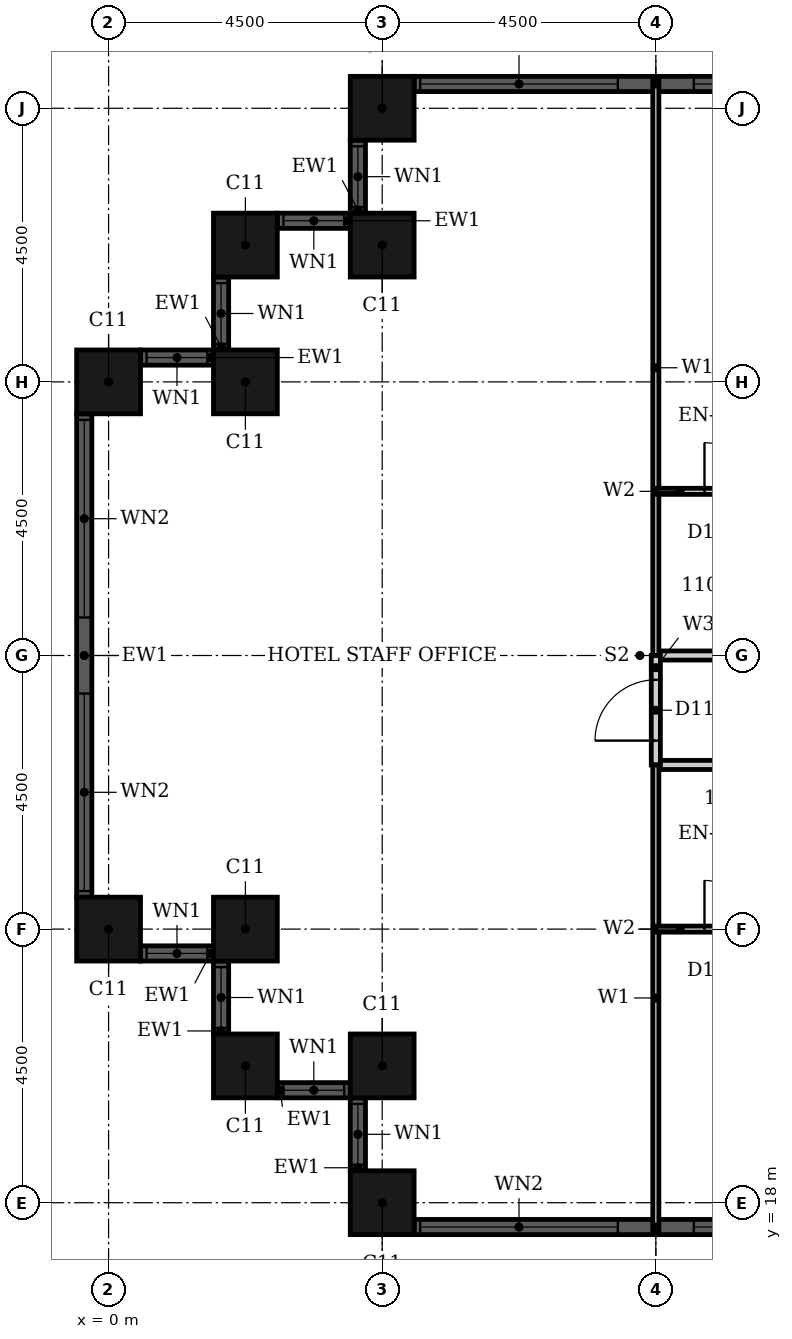
"""IFC4 building model, lengths in metres.
Left out: names, types, materials, properties, quantities, classifications, styles, units other than length and angle.
Written with IfcOpenShell. Run it as: python <this file> out.ifc"""

import sys

from ifc_helpers import new_model, si_unit, direction, frame, frame_2d, origin, origin_2d, place, context, subcontext, project, spatial, rectangle, hollow_rectangle, extrude, element, fill, save


model = new_model("IFC4")
c1 = context("Model", 3, precision=1e-05, world=origin(), true_north=direction((0.0, 1.0)))
c2 = subcontext(c1, "Body", "Model", "MODEL_VIEW")
j1 = project(units=[si_unit("LENGTHUNIT", "METRE"), si_unit("PLANEANGLEUNIT", "RADIAN")], contexts=[c1])
p1 = place(None, origin())
s1 = spatial("IfcSite", under=j1, at=p1, CompositionType="ELEMENT")
p2 = place(p1, origin())
s2 = spatial("IfcBuilding", under=s1, at=p2, CompositionType="ELEMENT")
p3 = place(p2, frame((0.0, 0.0, 52.8)))
s3 = spatial("IfcBuildingStorey", under=s2, at=p3, CompositionType="ELEMENT", Elevation=52.8)
for number, where, z_axis, x_axis in (
    (1, (4.5, 36.0, 0.0), (0.0, 0.0, 1.0), (1.0, 0.0, 0.0)),
    (2, (4.5, 33.75, 0.0), (0.0, 0.0, 1.0), (1.0, 0.0, 0.0)),
    (3, (2.25, 33.75, 0.0), (0.0, 0.0, 1.0), (1.0, 0.0, 0.0)),
    (4, (2.25, 31.5, 0.0), (0.0, 0.0, 1.0), (1.0, 0.0, 0.0)),
    (5, (0.0, 31.5, 0.0), (0.0, 0.0, 1.0), (1.0, 0.0, 0.0)),
    (6, (0.0, 22.5, 0.0), (0.0, 0.0, 1.0), (1.0, 0.0, 0.0)),
    (7, (2.25, 22.5, 0.0), (0.0, 0.0, 1.0), (1.0, 0.0, 0.0)),
    (8, (2.25, 20.25, 0.0), (0.0, 0.0, 1.0), (1.0, 0.0, 0.0)),
    (9, (4.5, 20.25, 0.0), (0.0, 0.0, 1.0), (1.0, 0.0, 0.0)),
    (10, (4.5, 18.0, 0.0), (0.0, 0.0, 1.0), (1.0, 0.0, 0.0)),
):
    element("IfcColumn", number, at=place(p3, frame(where, z_axis=z_axis, x_axis=x_axis)), inside=s3, PredefinedType="COLUMN", context=c2, shape_type="SweptSolid", body=[
        extrude(hollow_rectangle(XDim=1.05, YDim=1.05, WallThickness=0.034, at=origin_2d()), origin(), (0.0, 0.0, 1.0), 3.6),
    ])
p4 = place(p3, frame((12.975, 36.4, 0.0), z_axis=(0.0, 0.0, 1.0), x_axis=(-1.0, 0.0, 0.0)))
e11 = element("IfcWall", 11, at=p4, inside=s3, PredefinedType="SOLIDWALL", context=c2, shape_type="SweptSolid", body=[
    extrude(rectangle(XDim=7.95, YDim=0.25, at=frame_2d((3.975, 0.0))), origin(), (0.0, 0.0, 1.0), 3.6),
])
p5 = place(p4, frame((0.1, 0.0, 0.9)))
e12 = element("IfcOpeningElement", 12, at=p5, cuts=e11, PredefinedType="OPENING", context=c2, shape_type="SweptSolid", body=[
    extrude(rectangle(XDim=3.25, YDim=2.08, at=frame_2d((1.625, 1.04))), frame((0.0, 0.135, 0.0), z_axis=(0.0, -1.0, 0.0), x_axis=(1.0, 0.0, 0.0)), (0.0, 0.0, 1.0), 0.27),
])
p6 = place(p4, frame((4.6, 0.0, 0.9)))
e13 = element("IfcOpeningElement", 13, at=p6, cuts=e11, PredefinedType="OPENING", context=c2, shape_type="SweptSolid", body=[
    extrude(rectangle(XDim=3.25, YDim=2.08, at=frame_2d((1.625, 1.04))), frame((0.0, 0.135, 0.0), z_axis=(0.0, -1.0, 0.0), x_axis=(1.0, 0.0, 0.0)), (0.0, 0.0, 1.0), 0.27),
])
p7 = place(p3, frame((4.1, 35.475, 0.0), z_axis=(0.0, 0.0, 1.0), x_axis=(0.0, -1.0, 0.0)))
e14 = element("IfcWall", 14, at=p7, inside=s3, PredefinedType="SOLIDWALL", context=c2, shape_type="SweptSolid", body=[
    extrude(rectangle(XDim=1.2, YDim=0.25, at=frame_2d((0.6, 0.0))), origin(), (0.0, 0.0, 1.0), 3.6),
])
p8 = place(p7, frame((0.1, 0.0, 0.9)))
e15 = element("IfcOpeningElement", 15, at=p8, cuts=e14, PredefinedType="OPENING", context=c2, shape_type="SweptSolid", body=[
    extrude(rectangle(XDim=1.0, YDim=2.08, at=frame_2d((0.5, 1.04))), frame((0.0, 0.135, 0.0), z_axis=(0.0, -1.0, 0.0), x_axis=(1.0, 0.0, 0.0)), (0.0, 0.0, 1.0), 0.27),
])
p9 = place(p3, frame((3.975, 34.15, 0.0), z_axis=(0.0, 0.0, 1.0), x_axis=(-1.0, 0.0, 0.0)))
e16 = element("IfcWall", 16, at=p9, inside=s3, PredefinedType="SOLIDWALL", context=c2, shape_type="SweptSolid", body=[
    extrude(rectangle(XDim=1.2, YDim=0.25, at=frame_2d((0.6, 0.0))), origin(), (0.0, 0.0, 1.0), 3.6),
])
p10 = place(p9, frame((0.1, 0.0, 0.9)))
e17 = element("IfcOpeningElement", 17, at=p10, cuts=e16, PredefinedType="OPENING", context=c2, shape_type="SweptSolid", body=[
    extrude(rectangle(XDim=1.0, YDim=2.08, at=frame_2d((0.5, 1.04))), frame((0.0, 0.135, 0.0), z_axis=(0.0, -1.0, 0.0), x_axis=(1.0, 0.0, 0.0)), (0.0, 0.0, 1.0), 0.27),
])
p11 = place(p3, frame((1.85, 33.225, 0.0), z_axis=(0.0, 0.0, 1.0), x_axis=(0.0, -1.0, 0.0)))
e18 = element("IfcWall", 18, at=p11, inside=s3, PredefinedType="SOLIDWALL", context=c2, shape_type="SweptSolid", body=[
    extrude(rectangle(XDim=1.2, YDim=0.25, at=frame_2d((0.6, 0.0))), origin(), (0.0, 0.0, 1.0), 3.6),
])
p12 = place(p11, frame((0.1, 0.0, 0.9)))
e19 = element("IfcOpeningElement", 19, at=p12, cuts=e18, PredefinedType="OPENING", context=c2, shape_type="SweptSolid", body=[
    extrude(rectangle(XDim=1.0, YDim=2.08, at=frame_2d((0.5, 1.04))), frame((0.0, 0.135, 0.0), z_axis=(0.0, -1.0, 0.0), x_axis=(1.0, 0.0, 0.0)), (0.0, 0.0, 1.0), 0.27),
])
p13 = place(p3, frame((1.725, 31.9, 0.0), z_axis=(0.0, 0.0, 1.0), x_axis=(-1.0, 0.0, 0.0)))
e20 = element("IfcWall", 20, at=p13, inside=s3, PredefinedType="SOLIDWALL", context=c2, shape_type="SweptSolid", body=[
    extrude(rectangle(XDim=1.2, YDim=0.25, at=frame_2d((0.6, 0.0))), origin(), (0.0, 0.0, 1.0), 3.6),
])
p14 = place(p13, frame((0.1, 0.0, 0.9)))
e21 = element("IfcOpeningElement", 21, at=p14, cuts=e20, PredefinedType="OPENING", context=c2, shape_type="SweptSolid", body=[
    extrude(rectangle(XDim=1.0, YDim=2.08, at=frame_2d((0.5, 1.04))), frame((0.0, 0.135, 0.0), z_axis=(0.0, -1.0, 0.0), x_axis=(1.0, 0.0, 0.0)), (0.0, 0.0, 1.0), 0.27),
])
p15 = place(p3, frame((-0.4, 30.975, 0.0), z_axis=(0.0, 0.0, 1.0), x_axis=(0.0, -1.0, 0.0)))
e22 = element("IfcWall", 22, at=p15, inside=s3, PredefinedType="SOLIDWALL", context=c2, shape_type="SweptSolid", body=[
    extrude(rectangle(XDim=7.95, YDim=0.25, at=frame_2d((3.975, 0.0))), origin(), (0.0, 0.0, 1.0), 3.6),
])
p16 = place(p15, frame((0.1, 0.0, 0.9)))
e23 = element("IfcOpeningElement", 23, at=p16, cuts=e22, PredefinedType="OPENING", context=c2, shape_type="SweptSolid", body=[
    extrude(rectangle(XDim=3.25, YDim=2.08, at=frame_2d((1.625, 1.04))), frame((0.0, 0.135, 0.0), z_axis=(0.0, -1.0, 0.0), x_axis=(1.0, 0.0, 0.0)), (0.0, 0.0, 1.0), 0.27),
])
p17 = place(p15, frame((4.6, 0.0, 0.9)))
e24 = element("IfcOpeningElement", 24, at=p17, cuts=e22, PredefinedType="OPENING", context=c2, shape_type="SweptSolid", body=[
    extrude(rectangle(XDim=3.25, YDim=2.08, at=frame_2d((1.625, 1.04))), frame((0.0, 0.135, 0.0), z_axis=(0.0, -1.0, 0.0), x_axis=(1.0, 0.0, 0.0)), (0.0, 0.0, 1.0), 0.27),
])
p18 = place(p3, frame((0.525, 22.1, 0.0), z_axis=(0.0, 0.0, 1.0), x_axis=(1.0, 0.0, 0.0)))
e25 = element("IfcWall", 25, at=p18, inside=s3, PredefinedType="SOLIDWALL", context=c2, shape_type="SweptSolid", body=[
    extrude(rectangle(XDim=1.2, YDim=0.25, at=frame_2d((0.6, 0.0))), origin(), (0.0, 0.0, 1.0), 3.6),
])
p19 = place(p18, frame((0.1, 0.0, 0.9)))
e26 = element("IfcOpeningElement", 26, at=p19, cuts=e25, PredefinedType="OPENING", context=c2, shape_type="SweptSolid", body=[
    extrude(rectangle(XDim=1.0, YDim=2.08, at=frame_2d((0.5, 1.04))), frame((0.0, 0.135, 0.0), z_axis=(0.0, -1.0, 0.0), x_axis=(1.0, 0.0, 0.0)), (0.0, 0.0, 1.0), 0.27),
])
p20 = place(p3, frame((1.85, 21.975, 0.0), z_axis=(0.0, 0.0, 1.0), x_axis=(0.0, -1.0, 0.0)))
e27 = element("IfcWall", 27, at=p20, inside=s3, PredefinedType="SOLIDWALL", context=c2, shape_type="SweptSolid", body=[
    extrude(rectangle(XDim=1.2, YDim=0.25, at=frame_2d((0.6, 0.0))), origin(), (0.0, 0.0, 1.0), 3.6),
])
p21 = place(p20, frame((0.1, 0.0, 0.9)))
e28 = element("IfcOpeningElement", 28, at=p21, cuts=e27, PredefinedType="OPENING", context=c2, shape_type="SweptSolid", body=[
    extrude(rectangle(XDim=1.0, YDim=2.08, at=frame_2d((0.5, 1.04))), frame((0.0, 0.135, 0.0), z_axis=(0.0, -1.0, 0.0), x_axis=(1.0, 0.0, 0.0)), (0.0, 0.0, 1.0), 0.27),
])
p22 = place(p3, frame((2.775, 19.85, 0.0), z_axis=(0.0, 0.0, 1.0), x_axis=(1.0, 0.0, 0.0)))
e29 = element("IfcWall", 29, at=p22, inside=s3, PredefinedType="SOLIDWALL", context=c2, shape_type="SweptSolid", body=[
    extrude(rectangle(XDim=1.2, YDim=0.25, at=frame_2d((0.6, 0.0))), origin(), (0.0, 0.0, 1.0), 3.6),
])
p23 = place(p22, frame((0.1, 0.0, 0.9)))
e30 = element("IfcOpeningElement", 30, at=p23, cuts=e29, PredefinedType="OPENING", context=c2, shape_type="SweptSolid", body=[
    extrude(rectangle(XDim=1.0, YDim=2.08, at=frame_2d((0.5, 1.04))), frame((0.0, 0.135, 0.0), z_axis=(0.0, -1.0, 0.0), x_axis=(1.0, 0.0, 0.0)), (0.0, 0.0, 1.0), 0.27),
])
p24 = place(p3, frame((4.1, 19.725, 0.0), z_axis=(0.0, 0.0, 1.0), x_axis=(0.0, -1.0, 0.0)))
e31 = element("IfcWall", 31, at=p24, inside=s3, PredefinedType="SOLIDWALL", context=c2, shape_type="SweptSolid", body=[
    extrude(rectangle(XDim=1.2, YDim=0.25, at=frame_2d((0.6, 0.0))), origin(), (0.0, 0.0, 1.0), 3.6),
])
p25 = place(p24, frame((0.1, 0.0, 0.9)))
e32 = element("IfcOpeningElement", 32, at=p25, cuts=e31, PredefinedType="OPENING", context=c2, shape_type="SweptSolid", body=[
    extrude(rectangle(XDim=1.0, YDim=2.08, at=frame_2d((0.5, 1.04))), frame((0.0, 0.135, 0.0), z_axis=(0.0, -1.0, 0.0), x_axis=(1.0, 0.0, 0.0)), (0.0, 0.0, 1.0), 0.27),
])
p26 = place(p3, frame((5.025, 17.6, 0.0), z_axis=(0.0, 0.0, 1.0), x_axis=(1.0, 0.0, 0.0)))
e33 = element("IfcWall", 33, at=p26, inside=s3, PredefinedType="SOLIDWALL", context=c2, shape_type="SweptSolid", body=[
    extrude(rectangle(XDim=7.95, YDim=0.25, at=frame_2d((3.975, 0.0))), origin(), (0.0, 0.0, 1.0), 3.6),
])
p27 = place(p26, frame((0.1, 0.0, 0.9)))
e34 = element("IfcOpeningElement", 34, at=p27, cuts=e33, PredefinedType="OPENING", context=c2, shape_type="SweptSolid", body=[
    extrude(rectangle(XDim=3.25, YDim=2.08, at=frame_2d((1.625, 1.04))), frame((0.0, 0.135, 0.0), z_axis=(0.0, -1.0, 0.0), x_axis=(1.0, 0.0, 0.0)), (0.0, 0.0, 1.0), 0.27),
])
p28 = place(p26, frame((4.6, 0.0, 0.9)))
e35 = element("IfcOpeningElement", 35, at=p28, cuts=e33, PredefinedType="OPENING", context=c2, shape_type="SweptSolid", body=[
    extrude(rectangle(XDim=3.25, YDim=2.08, at=frame_2d((1.625, 1.04))), frame((0.0, 0.135, 0.0), z_axis=(0.0, -1.0, 0.0), x_axis=(1.0, 0.0, 0.0)), (0.0, 0.0, 1.0), 0.27),
])
p29 = place(p3, frame((9.0, 25.2, 0.0), z_axis=(0.0, 0.0, 1.0), x_axis=(1.0, 0.0, 0.0)))
e36 = element("IfcWall", 36, at=p29, inside=s3, PredefinedType="PARTITIONING", context=c2, shape_type="SweptSolid", body=[
    extrude(rectangle(XDim=7.2, YDim=0.15, at=frame_2d((3.6, 0.0))), origin(), (0.0, 0.0, 1.0), 3.3),
])
p30 = place(p29, frame((2.95, 0.0, 0.0)))
e37 = element("IfcOpeningElement", 37, at=p30, cuts=e36, PredefinedType="OPENING", context=c2, shape_type="SweptSolid", body=[
    extrude(rectangle(XDim=1.0, YDim=2.1, at=frame_2d((0.5, 1.05))), frame((0.0, 0.085, 0.0), z_axis=(0.0, -1.0, 0.0), x_axis=(1.0, 0.0, 0.0)), (0.0, 0.0, 1.0), 0.17),
])
p31 = place(p3, frame((9.0, 27.0, 0.0), z_axis=(0.0, 0.0, 1.0), x_axis=(1.0, 0.0, 0.0)))
e38 = element("IfcWall", 38, at=p31, inside=s3, PredefinedType="PARTITIONING", context=c2, shape_type="SweptSolid", body=[
    extrude(rectangle(XDim=7.2, YDim=0.15, at=frame_2d((3.6, 0.0))), origin(), (0.0, 0.0, 1.0), 2.58),
])
p32 = place(p31, frame((2.95, 0.0, 0.0)))
e39 = element("IfcOpeningElement", 39, at=p32, cuts=e38, PredefinedType="OPENING", context=c2, shape_type="SweptSolid", body=[
    extrude(rectangle(XDim=1.0, YDim=2.1, at=frame_2d((0.5, 1.05))), frame((0.0, 0.085, 0.0), z_axis=(0.0, -1.0, 0.0), x_axis=(1.0, 0.0, 0.0)), (0.0, 0.0, 1.0), 0.17),
])
p33 = place(p3, frame((9.0, 25.2, 0.0), z_axis=(0.0, 0.0, 1.0), x_axis=(0.0, 1.0, 0.0)))
e40 = element("IfcWall", 40, at=p33, inside=s3, PredefinedType="PARTITIONING", context=c2, shape_type="SweptSolid", body=[
    extrude(rectangle(XDim=1.8, YDim=0.15, at=frame_2d((0.9, 0.0))), origin(), (0.0, 0.0, 1.0), 3.3),
])
p34 = place(p33, frame((0.4, 0.0, 0.0)))
e41 = element("IfcOpeningElement", 41, at=p34, cuts=e40, PredefinedType="OPENING", context=c2, shape_type="SweptSolid", body=[
    extrude(rectangle(XDim=1.0, YDim=2.1, at=frame_2d((0.5, 1.05))), frame((0.0, 0.085, 0.0), z_axis=(0.0, -1.0, 0.0), x_axis=(1.0, 0.0, 0.0)), (0.0, 0.0, 1.0), 0.17),
])
p35 = place(p3, frame((9.0, 27.0, 0.0), z_axis=(0.0, 0.0, 1.0), x_axis=(0.0, 1.0, 0.0)))
e42 = element("IfcWall", 42, at=p35, inside=s3, PredefinedType="PARTITIONING", context=c2, shape_type="SweptSolid", body=[
    extrude(rectangle(XDim=9.465, YDim=0.1, at=frame_2d((4.732, 0.0))), origin(), (0.0, 0.0, 1.0), 3.3),
])
p36 = place(p3, frame((9.0, 17.535, 0.0), z_axis=(0.0, 0.0, 1.0), x_axis=(0.0, 1.0, 0.0)))
e43 = element("IfcWall", 43, at=p36, inside=s3, PredefinedType="PARTITIONING", context=c2, shape_type="SweptSolid", body=[
    extrude(rectangle(XDim=7.665, YDim=0.1, at=frame_2d((3.833, 0.0))), origin(), (0.0, 0.0, 1.0), 3.3),
])
p37 = place(p3, frame((9.0, 22.5, 0.0), z_axis=(0.0, 0.0, 1.0), x_axis=(1.0, 0.0, 0.0)))
e44 = element("IfcWall", 44, at=p37, inside=s3, PredefinedType="PARTITIONING", context=c2, shape_type="SweptSolid", body=[
    extrude(rectangle(XDim=2.4, YDim=0.1, at=frame_2d((1.2, 0.0))), origin(), (0.0, 0.0, 1.0), 2.58),
])
p38 = place(p37, frame((0.8, 0.0, 0.0)))
e45 = element("IfcOpeningElement", 45, at=p38, cuts=e44, PredefinedType="OPENING", context=c2, shape_type="SweptSolid", body=[
    extrude(rectangle(XDim=0.8, YDim=2.1, at=frame_2d((0.4, 1.05))), frame((0.0, 0.06, 0.0), z_axis=(0.0, -1.0, 0.0), x_axis=(1.0, 0.0, 0.0)), (0.0, 0.0, 1.0), 0.12),
])
p39 = place(p3, frame((9.0, 29.7, 0.0), z_axis=(0.0, 0.0, 1.0), x_axis=(1.0, 0.0, 0.0)))
e46 = element("IfcWall", 46, at=p39, inside=s3, PredefinedType="PARTITIONING", context=c2, shape_type="SweptSolid", body=[
    extrude(rectangle(XDim=2.4, YDim=0.1, at=frame_2d((1.2, 0.0))), origin(), (0.0, 0.0, 1.0), 3.3),
])
p40 = place(p39, frame((0.8, 0.0, 0.0)))
e47 = element("IfcOpeningElement", 47, at=p40, cuts=e46, PredefinedType="OPENING", context=c2, shape_type="SweptSolid", body=[
    extrude(rectangle(XDim=0.8, YDim=2.1, at=frame_2d((0.4, 1.05))), frame((0.0, 0.06, 0.0), z_axis=(0.0, -1.0, 0.0), x_axis=(1.0, 0.0, 0.0)), (0.0, 0.0, 1.0), 0.12),
])
p41 = place(p5, origin())
e48 = element("IfcWindow", 48, at=p41, inside=s3, PartitioningType="SINGLE_PANEL", PredefinedType="WINDOW", context=c2, shape_type="SweptSolid", body=[
    extrude(rectangle(XDim=3.25, YDim=2.08, at=frame_2d((1.625, 1.04))), frame((0.0, 0.03, 0.0), z_axis=(0.0, -1.0, 0.0), x_axis=(1.0, 0.0, 0.0)), (0.0, 0.0, 1.0), 0.06),
])
fill(e12, e48)
p42 = place(p6, origin())
e49 = element("IfcWindow", 49, at=p42, inside=s3, PartitioningType="SINGLE_PANEL", PredefinedType="WINDOW", context=c2, shape_type="SweptSolid", body=[
    extrude(rectangle(XDim=3.25, YDim=2.08, at=frame_2d((1.625, 1.04))), frame((0.0, 0.03, 0.0), z_axis=(0.0, -1.0, 0.0), x_axis=(1.0, 0.0, 0.0)), (0.0, 0.0, 1.0), 0.06),
])
fill(e13, e49)
p43 = place(p8, origin())
e50 = element("IfcWindow", 50, at=p43, inside=s3, PartitioningType="SINGLE_PANEL", PredefinedType="WINDOW", context=c2, shape_type="SweptSolid", body=[
    extrude(rectangle(XDim=1.0, YDim=2.08, at=frame_2d((0.5, 1.04))), frame((0.0, 0.03, 0.0), z_axis=(0.0, -1.0, 0.0), x_axis=(1.0, 0.0, 0.0)), (0.0, 0.0, 1.0), 0.06),
])
fill(e15, e50)
p44 = place(p10, origin())
e51 = element("IfcWindow", 51, at=p44, inside=s3, PartitioningType="SINGLE_PANEL", PredefinedType="WINDOW", context=c2, shape_type="SweptSolid", body=[
    extrude(rectangle(XDim=1.0, YDim=2.08, at=frame_2d((0.5, 1.04))), frame((0.0, 0.03, 0.0), z_axis=(0.0, -1.0, 0.0), x_axis=(1.0, 0.0, 0.0)), (0.0, 0.0, 1.0), 0.06),
])
fill(e17, e51)
p45 = place(p12, origin())
e52 = element("IfcWindow", 52, at=p45, inside=s3, PartitioningType="SINGLE_PANEL", PredefinedType="WINDOW", context=c2, shape_type="SweptSolid", body=[
    extrude(rectangle(XDim=1.0, YDim=2.08, at=frame_2d((0.5, 1.04))), frame((0.0, 0.03, 0.0), z_axis=(0.0, -1.0, 0.0), x_axis=(1.0, 0.0, 0.0)), (0.0, 0.0, 1.0), 0.06),
])
fill(e19, e52)
p46 = place(p14, origin())
e53 = element("IfcWindow", 53, at=p46, inside=s3, PartitioningType="SINGLE_PANEL", PredefinedType="WINDOW", context=c2, shape_type="SweptSolid", body=[
    extrude(rectangle(XDim=1.0, YDim=2.08, at=frame_2d((0.5, 1.04))), frame((0.0, 0.03, 0.0), z_axis=(0.0, -1.0, 0.0), x_axis=(1.0, 0.0, 0.0)), (0.0, 0.0, 1.0), 0.06),
])
fill(e21, e53)
p47 = place(p16, origin())
e54 = element("IfcWindow", 54, at=p47, inside=s3, PartitioningType="SINGLE_PANEL", PredefinedType="WINDOW", context=c2, shape_type="SweptSolid", body=[
    extrude(rectangle(XDim=3.25, YDim=2.08, at=frame_2d((1.625, 1.04))), frame((0.0, 0.03, 0.0), z_axis=(0.0, -1.0, 0.0), x_axis=(1.0, 0.0, 0.0)), (0.0, 0.0, 1.0), 0.06),
])
fill(e23, e54)
p48 = place(p17, origin())
e55 = element("IfcWindow", 55, at=p48, inside=s3, PartitioningType="SINGLE_PANEL", PredefinedType="WINDOW", context=c2, shape_type="SweptSolid", body=[
    extrude(rectangle(XDim=3.25, YDim=2.08, at=frame_2d((1.625, 1.04))), frame((0.0, 0.03, 0.0), z_axis=(0.0, -1.0, 0.0), x_axis=(1.0, 0.0, 0.0)), (0.0, 0.0, 1.0), 0.06),
])
fill(e24, e55)
p49 = place(p19, origin())
e56 = element("IfcWindow", 56, at=p49, inside=s3, PartitioningType="SINGLE_PANEL", PredefinedType="WINDOW", context=c2, shape_type="SweptSolid", body=[
    extrude(rectangle(XDim=1.0, YDim=2.08, at=frame_2d((0.5, 1.04))), frame((0.0, 0.03, 0.0), z_axis=(0.0, -1.0, 0.0), x_axis=(1.0, 0.0, 0.0)), (0.0, 0.0, 1.0), 0.06),
])
fill(e26, e56)
p50 = place(p21, origin())
e57 = element("IfcWindow", 57, at=p50, inside=s3, PartitioningType="SINGLE_PANEL", PredefinedType="WINDOW", context=c2, shape_type="SweptSolid", body=[
    extrude(rectangle(XDim=1.0, YDim=2.08, at=frame_2d((0.5, 1.04))), frame((0.0, 0.03, 0.0), z_axis=(0.0, -1.0, 0.0), x_axis=(1.0, 0.0, 0.0)), (0.0, 0.0, 1.0), 0.06),
])
fill(e28, e57)
p51 = place(p23, origin())
e58 = element("IfcWindow", 58, at=p51, inside=s3, PartitioningType="SINGLE_PANEL", PredefinedType="WINDOW", context=c2, shape_type="SweptSolid", body=[
    extrude(rectangle(XDim=1.0, YDim=2.08, at=frame_2d((0.5, 1.04))), frame((0.0, 0.03, 0.0), z_axis=(0.0, -1.0, 0.0), x_axis=(1.0, 0.0, 0.0)), (0.0, 0.0, 1.0), 0.06),
])
fill(e30, e58)
p52 = place(p25, origin())
e59 = element("IfcWindow", 59, at=p52, inside=s3, PartitioningType="SINGLE_PANEL", PredefinedType="WINDOW", context=c2, shape_type="SweptSolid", body=[
    extrude(rectangle(XDim=1.0, YDim=2.08, at=frame_2d((0.5, 1.04))), frame((0.0, 0.03, 0.0), z_axis=(0.0, -1.0, 0.0), x_axis=(1.0, 0.0, 0.0)), (0.0, 0.0, 1.0), 0.06),
])
fill(e32, e59)
p53 = place(p27, origin())
e60 = element("IfcWindow", 60, at=p53, inside=s3, PartitioningType="SINGLE_PANEL", PredefinedType="WINDOW", context=c2, shape_type="SweptSolid", body=[
    extrude(rectangle(XDim=3.25, YDim=2.08, at=frame_2d((1.625, 1.04))), frame((0.0, 0.03, 0.0), z_axis=(0.0, -1.0, 0.0), x_axis=(1.0, 0.0, 0.0)), (0.0, 0.0, 1.0), 0.06),
])
fill(e34, e60)
p54 = place(p28, origin())
e61 = element("IfcWindow", 61, at=p54, inside=s3, PartitioningType="SINGLE_PANEL", PredefinedType="WINDOW", context=c2, shape_type="SweptSolid", body=[
    extrude(rectangle(XDim=3.25, YDim=2.08, at=frame_2d((1.625, 1.04))), frame((0.0, 0.03, 0.0), z_axis=(0.0, -1.0, 0.0), x_axis=(1.0, 0.0, 0.0)), (0.0, 0.0, 1.0), 0.06),
])
fill(e35, e61)
p55 = place(p38, origin())
e62 = element("IfcDoor", 62, at=p55, inside=s3, OperationType="SINGLE_SWING_LEFT", PredefinedType="DOOR", context=c2, shape_type="SweptSolid", body=[
    extrude(rectangle(XDim=0.8, YDim=2.1, at=frame_2d((0.4, 1.05))), frame((0.0, 0.025, 0.0), z_axis=(0.0, -1.0, 0.0), x_axis=(1.0, 0.0, 0.0)), (0.0, 0.0, 1.0), 0.05),
])
fill(e45, e62)
p56 = place(p40, origin())
e63 = element("IfcDoor", 63, at=p56, inside=s3, OperationType="SINGLE_SWING_RIGHT", PredefinedType="DOOR", context=c2, shape_type="SweptSolid", body=[
    extrude(rectangle(XDim=0.8, YDim=2.1, at=frame_2d((0.4, 1.05))), frame((0.0, 0.025, 0.0), z_axis=(0.0, -1.0, 0.0), x_axis=(1.0, 0.0, 0.0)), (0.0, 0.0, 1.0), 0.05),
])
fill(e47, e63)
p57 = place(p34, origin())
e64 = element("IfcDoor", 64, at=p57, inside=s3, OperationType="SINGLE_SWING_RIGHT", PredefinedType="DOOR", context=c2, shape_type="SweptSolid", body=[
    extrude(rectangle(XDim=1.0, YDim=2.1, at=frame_2d((0.5, 1.05))), frame((0.0, 0.025, 0.0), z_axis=(0.0, -1.0, 0.0), x_axis=(1.0, 0.0, 0.0)), (0.0, 0.0, 1.0), 0.05),
])
fill(e41, e64)
save(model, sys.argv[1])
